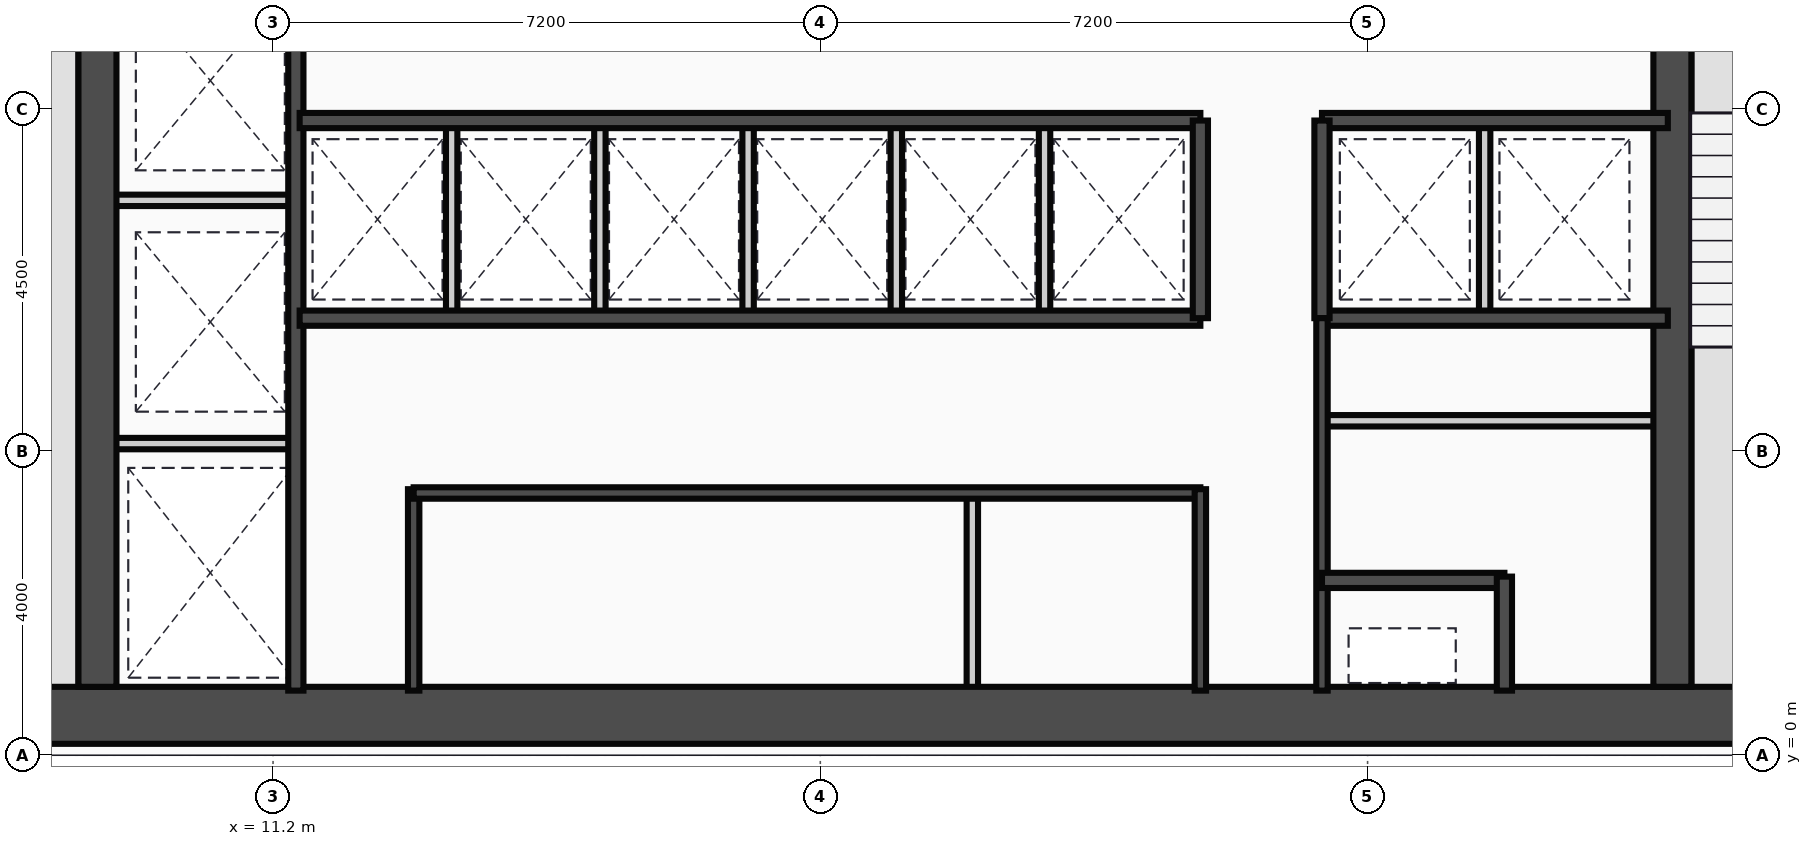
"""IFC4 building model, lengths in metres.
Left out: names, types, materials, properties, quantities, classifications, styles, units other than length and angle.
Written with IfcOpenShell. Run it as: python <this file> out.ifc"""

import sys

from ifc_helpers import new_model, si_unit, direction, frame, frame_2d, origin, place, context, subcontext, project, spatial, rectangle, extrude, source, transform, mapped, element, fill, save


model = new_model("IFC4")
c1 = context("Model", 3, precision=1e-05, world=origin(), true_north=direction((0.0, 1.0)))
c2 = subcontext(c1, "Body", "Model", "MODEL_VIEW")
j1 = project(units=[si_unit("LENGTHUNIT", "METRE"), si_unit("PLANEANGLEUNIT", "RADIAN")], contexts=[c1])
p1 = place(None, origin())
s1 = spatial("IfcSite", under=j1, at=p1, CompositionType="ELEMENT")
p2 = place(p1, origin())
s2 = spatial("IfcBuilding", under=s1, at=p2, CompositionType="ELEMENT")
p3 = place(p2, frame((0.0, 0.0, 184.4)))
s3 = spatial("IfcBuildingStorey", under=s2, at=p3, CompositionType="ELEMENT", Elevation=184.4)
m1 = source(origin(), c2, "Body", "SweptSolid", [
    extrude(rectangle(XDim=29.5, YDim=0.75, at=frame_2d((14.75, 0.0))), origin(), (0.0, 0.0, 1.0), 4.2),
])
p4 = place(p3, frame((4.5, 0.525, 0.0), z_axis=(0.0, 0.0, 1.0), x_axis=(1.0, 0.0, 0.0)))
e1 = element("IfcWall", 1, at=p4, inside=s3, PredefinedType="SHEAR", context=c2, shape_type="MappedRepresentation", body=[
    mapped(m1, transform((0.0, 0.0, 0.0))),
])
m2 = source(origin(), c2, "Body", "SweptSolid", [
    extrude(rectangle(XDim=12.35, YDim=0.5, at=frame_2d((6.175, 0.0))), origin(), (0.0, 0.0, 1.0), 4.2),
])
for number, where, z_axis, x_axis in (
    (2, (8.89, 0.9, 0.0), (0.0, 0.0, 1.0), (0.0, 1.0, 0.0)),
    (3, (29.61, 0.9, 0.0), (0.0, 0.0, 1.0), (0.0, 1.0, 0.0)),
):
    element("IfcWall", number, at=place(p3, frame(where, z_axis=z_axis, x_axis=x_axis)), inside=s3, PredefinedType="SHEAR", context=c2, shape_type="MappedRepresentation", body=[
        mapped(m2, transform((0.0, 0.0, 0.0))),
    ])
m3 = source(origin(), c2, "Body", "SweptSolid", [
    extrude(rectangle(XDim=9.6, YDim=0.2, at=frame_2d((4.8, 0.0))), origin(), (0.0, 0.0, 1.0), 3.95),
])
p5 = place(p3, frame((11.5, 0.85, 0.0), z_axis=(0.0, 0.0, 1.0), x_axis=(0.0, 1.0, 0.0)))
e4 = element("IfcWall", 4, at=p5, inside=s3, PredefinedType="PARTITIONING", context=c2, shape_type="MappedRepresentation", body=[
    mapped(m3, transform((0.0, 0.0, 0.0))),
])
p6 = place(p5, frame((4.2, 0.0, 0.0)))
e5 = element("IfcOpeningElement", 5, at=p6, cuts=e4, PredefinedType="OPENING", context=c2, shape_type="SweptSolid", body=[
    extrude(rectangle(XDim=1.1, YDim=2.15, at=frame_2d((0.55, 1.075))), frame((0.0, 0.11, 0.0), z_axis=(0.0, -1.0, 0.0), x_axis=(1.0, 0.0, 0.0)), (0.0, 0.0, 1.0), 0.22),
])
p7 = place(p5, frame((0.9, 0.0, 0.0)))
e6 = element("IfcOpeningElement", 6, at=p7, cuts=e4, PredefinedType="OPENING", context=c2, shape_type="SweptSolid", body=[
    extrude(rectangle(XDim=1.2, YDim=2.15, at=frame_2d((0.6, 1.075))), frame((0.0, 0.11, 0.0), z_axis=(0.0, -1.0, 0.0), x_axis=(1.0, 0.0, 0.0)), (0.0, 0.0, 1.0), 0.22),
])
m4 = source(origin(), c2, "Body", "SweptSolid", [
    extrude(rectangle(XDim=2.4, YDim=0.15, at=frame_2d((1.2, 0.0))), origin(), (0.0, 0.0, 1.0), 3.95),
])
for number, where, z_axis, x_axis in (
    (7, (9.1, 4.1, 0.0), (0.0, 0.0, 1.0), (1.0, 0.0, 0.0)),
    (8, (9.1, 7.3, 0.0), (0.0, 0.0, 1.0), (1.0, 0.0, 0.0)),
):
    element("IfcWall", number, at=place(p3, frame(where, z_axis=z_axis, x_axis=x_axis)), inside=s3, PredefinedType="PARTITIONING", context=c2, shape_type="MappedRepresentation", body=[
        mapped(m4, transform((0.0, 0.0, 0.0))),
    ])
m5 = source(origin(), c2, "Body", "SweptSolid", [
    extrude(rectangle(XDim=2.65, YDim=0.15, at=frame_2d((1.325, 0.0))), origin(), (0.0, 0.0, 1.0), 3.95),
])
p8 = place(p3, frame((13.05, 0.85, 0.0), z_axis=(0.0, 0.0, 1.0), x_axis=(0.0, 1.0, 0.0)))
e9 = element("IfcWall", 9, at=p8, inside=s3, PredefinedType="PARTITIONING", context=c2, shape_type="MappedRepresentation", body=[
    mapped(m5, transform((0.0, 0.0, 0.0))),
])
m6 = source(origin(), c2, "Body", "SweptSolid", [
    extrude(rectangle(XDim=10.35, YDim=0.15, at=frame_2d((5.175, 0.0))), origin(), (0.0, 0.0, 1.0), 3.95),
])
p9 = place(p3, frame((13.05, 3.45, 0.0), z_axis=(0.0, 0.0, 1.0), x_axis=(1.0, 0.0, 0.0)))
e10 = element("IfcWall", 10, at=p9, inside=s3, PredefinedType="PARTITIONING", context=c2, shape_type="MappedRepresentation", body=[
    mapped(m6, transform((0.0, 0.0, 0.0))),
])
p10 = place(p9, frame((3.8, 0.0, 0.0)))
e11 = element("IfcOpeningElement", 11, at=p10, cuts=e10, PredefinedType="OPENING", context=c2, shape_type="SweptSolid", body=[
    extrude(rectangle(XDim=0.95, YDim=2.15, at=frame_2d((0.475, 1.075))), frame((0.0, 0.085, 0.0), z_axis=(0.0, -1.0, 0.0), x_axis=(1.0, 0.0, 0.0)), (0.0, 0.0, 1.0), 0.17),
])
p11 = place(p9, frame((8.1, 0.0, 0.0)))
e12 = element("IfcOpeningElement", 12, at=p11, cuts=e10, PredefinedType="OPENING", context=c2, shape_type="SweptSolid", body=[
    extrude(rectangle(XDim=0.95, YDim=2.15, at=frame_2d((0.475, 1.075))), frame((0.0, 0.085, 0.0), z_axis=(0.0, -1.0, 0.0), x_axis=(1.0, 0.0, 0.0)), (0.0, 0.0, 1.0), 0.17),
])
p12 = place(p3, frame((23.4, 0.85, 0.0), z_axis=(0.0, 0.0, 1.0), x_axis=(0.0, 1.0, 0.0)))
e13 = element("IfcWall", 13, at=p12, inside=s3, PredefinedType="PARTITIONING", context=c2, shape_type="MappedRepresentation", body=[
    mapped(m5, transform((0.0, 0.0, 0.0))),
])
m7 = source(origin(), c2, "Body", "SweptSolid", [
    extrude(rectangle(XDim=2.6, YDim=0.15, at=frame_2d((1.3, 0.0))), origin(), (0.0, 0.0, 1.0), 3.95),
])
p13 = place(p3, frame((20.4, 0.85, 0.0), z_axis=(0.0, 0.0, 1.0), x_axis=(0.0, 1.0, 0.0)))
e14 = element("IfcWall", 14, at=p13, inside=s3, PredefinedType="PARTITIONING", context=c2, shape_type="MappedRepresentation", body=[
    mapped(m7, transform((0.0, 0.0, 0.0))),
])
m8 = source(origin(), c2, "Body", "SweptSolid", [
    extrude(rectangle(XDim=11.85, YDim=0.2, at=frame_2d((5.925, 0.0))), origin(), (0.0, 0.0, 1.0), 3.95),
])
p14 = place(p3, frame((11.55, 5.75, 0.0), z_axis=(0.0, 0.0, 1.0), x_axis=(1.0, 0.0, 0.0)))
e15 = element("IfcWall", 15, at=p14, inside=s3, PredefinedType="PARTITIONING", context=c2, shape_type="MappedRepresentation", body=[
    mapped(m8, transform((0.0, 0.0, 0.0))),
])
p15 = place(p14, frame((0.45, 0.0, 0.0)))
e16 = element("IfcOpeningElement", 16, at=p15, cuts=e15, PredefinedType="OPENING", context=c2, shape_type="SweptSolid", body=[
    extrude(rectangle(XDim=1.05, YDim=2.15, at=frame_2d((0.525, 1.075))), frame((0.0, 0.11, 0.0), z_axis=(0.0, -1.0, 0.0), x_axis=(1.0, 0.0, 0.0)), (0.0, 0.0, 1.0), 0.22),
])
p16 = place(p14, frame((2.4, 0.0, 0.0)))
e17 = element("IfcOpeningElement", 17, at=p16, cuts=e15, PredefinedType="OPENING", context=c2, shape_type="SweptSolid", body=[
    extrude(rectangle(XDim=1.05, YDim=2.15, at=frame_2d((0.525, 1.075))), frame((0.0, 0.11, 0.0), z_axis=(0.0, -1.0, 0.0), x_axis=(1.0, 0.0, 0.0)), (0.0, 0.0, 1.0), 0.22),
])
p17 = place(p14, frame((4.35, 0.0, 0.0)))
e18 = element("IfcOpeningElement", 18, at=p17, cuts=e15, PredefinedType="OPENING", context=c2, shape_type="SweptSolid", body=[
    extrude(rectangle(XDim=1.05, YDim=2.15, at=frame_2d((0.525, 1.075))), frame((0.0, 0.11, 0.0), z_axis=(0.0, -1.0, 0.0), x_axis=(1.0, 0.0, 0.0)), (0.0, 0.0, 1.0), 0.22),
])
p18 = place(p14, frame((6.3, 0.0, 0.0)))
e19 = element("IfcOpeningElement", 19, at=p18, cuts=e15, PredefinedType="OPENING", context=c2, shape_type="SweptSolid", body=[
    extrude(rectangle(XDim=1.05, YDim=2.15, at=frame_2d((0.525, 1.075))), frame((0.0, 0.11, 0.0), z_axis=(0.0, -1.0, 0.0), x_axis=(1.0, 0.0, 0.0)), (0.0, 0.0, 1.0), 0.22),
])
p19 = place(p14, frame((8.25, 0.0, 0.0)))
e20 = element("IfcOpeningElement", 20, at=p19, cuts=e15, PredefinedType="OPENING", context=c2, shape_type="SweptSolid", body=[
    extrude(rectangle(XDim=1.05, YDim=2.15, at=frame_2d((0.525, 1.075))), frame((0.0, 0.11, 0.0), z_axis=(0.0, -1.0, 0.0), x_axis=(1.0, 0.0, 0.0)), (0.0, 0.0, 1.0), 0.22),
])
p20 = place(p14, frame((10.2, 0.0, 0.0)))
e21 = element("IfcOpeningElement", 21, at=p20, cuts=e15, PredefinedType="OPENING", context=c2, shape_type="SweptSolid", body=[
    extrude(rectangle(XDim=1.05, YDim=2.15, at=frame_2d((0.525, 1.075))), frame((0.0, 0.11, 0.0), z_axis=(0.0, -1.0, 0.0), x_axis=(1.0, 0.0, 0.0)), (0.0, 0.0, 1.0), 0.22),
])
p21 = place(p3, frame((11.55, 8.35, 0.0), z_axis=(0.0, 0.0, 1.0), x_axis=(1.0, 0.0, 0.0)))
e22 = element("IfcWall", 22, at=p21, inside=s3, PredefinedType="PARTITIONING", context=c2, shape_type="MappedRepresentation", body=[
    mapped(m8, transform((0.0, 0.0, 0.0))),
])
m9 = source(origin(), c2, "Body", "SweptSolid", [
    extrude(rectangle(XDim=2.6, YDim=0.2, at=frame_2d((1.3, 0.0))), origin(), (0.0, 0.0, 1.0), 3.95),
])
p22 = place(p3, frame((23.4, 5.75, 0.0), z_axis=(0.0, 0.0, 1.0), x_axis=(0.0, 1.0, 0.0)))
e23 = element("IfcWall", 23, at=p22, inside=s3, PredefinedType="PARTITIONING", context=c2, shape_type="MappedRepresentation", body=[
    mapped(m9, transform((0.0, 0.0, 0.0))),
])
m10 = source(origin(), c2, "Body", "SweptSolid", [
    extrude(rectangle(XDim=2.5, YDim=0.15, at=frame_2d((1.25, 0.0))), origin(), (0.0, 0.0, 1.0), 3.95),
])
for number, where, z_axis, x_axis in (
    (24, (13.55, 5.8, 0.0), (0.0, 0.0, 1.0), (0.0, 1.0, 0.0)),
    (25, (15.5, 5.8, 0.0), (0.0, 0.0, 1.0), (0.0, 1.0, 0.0)),
    (26, (17.45, 5.8, 0.0), (0.0, 0.0, 1.0), (0.0, 1.0, 0.0)),
    (27, (19.4, 5.8, 0.0), (0.0, 0.0, 1.0), (0.0, 1.0, 0.0)),
    (28, (21.35, 5.8, 0.0), (0.0, 0.0, 1.0), (0.0, 1.0, 0.0)),
):
    element("IfcWall", number, at=place(p3, frame(where, z_axis=z_axis, x_axis=x_axis)), inside=s3, PredefinedType="PARTITIONING", context=c2, shape_type="MappedRepresentation", body=[
        mapped(m10, transform((0.0, 0.0, 0.0))),
    ])
m11 = source(origin(), c2, "Body", "SweptSolid", [
    extrude(rectangle(XDim=4.55, YDim=0.2, at=frame_2d((2.275, 0.0))), origin(), (0.0, 0.0, 1.0), 3.95),
])
p23 = place(p3, frame((25.0, 8.35, 0.0), z_axis=(0.0, 0.0, 1.0), x_axis=(1.0, 0.0, 0.0)))
e29 = element("IfcWall", 29, at=p23, inside=s3, PredefinedType="PARTITIONING", context=c2, shape_type="MappedRepresentation", body=[
    mapped(m11, transform((0.0, 0.0, 0.0))),
])
p24 = place(p23, frame((0.5, 0.0, 0.0)))
e30 = element("IfcOpeningElement", 30, at=p24, cuts=e29, PredefinedType="OPENING", context=c2, shape_type="SweptSolid", body=[
    extrude(rectangle(XDim=1.05, YDim=2.15, at=frame_2d((0.525, 1.075))), frame((0.0, 0.11, 0.0), z_axis=(0.0, -1.0, 0.0), x_axis=(1.0, 0.0, 0.0)), (0.0, 0.0, 1.0), 0.22),
])
p25 = place(p23, frame((2.6, 0.0, 0.0)))
e31 = element("IfcOpeningElement", 31, at=p25, cuts=e29, PredefinedType="OPENING", context=c2, shape_type="SweptSolid", body=[
    extrude(rectangle(XDim=1.05, YDim=2.15, at=frame_2d((0.525, 1.075))), frame((0.0, 0.11, 0.0), z_axis=(0.0, -1.0, 0.0), x_axis=(1.0, 0.0, 0.0)), (0.0, 0.0, 1.0), 0.22),
])
p26 = place(p3, frame((25.0, 5.75, 0.0), z_axis=(0.0, 0.0, 1.0), x_axis=(1.0, 0.0, 0.0)))
e32 = element("IfcWall", 32, at=p26, inside=s3, PredefinedType="PARTITIONING", context=c2, shape_type="MappedRepresentation", body=[
    mapped(m11, transform((0.0, 0.0, 0.0))),
])
p27 = place(p3, frame((25.0, 5.75, 0.0), z_axis=(0.0, 0.0, 1.0), x_axis=(0.0, 1.0, 0.0)))
e33 = element("IfcWall", 33, at=p27, inside=s3, PredefinedType="PARTITIONING", context=c2, shape_type="MappedRepresentation", body=[
    mapped(m9, transform((0.0, 0.0, 0.0))),
])
p28 = place(p3, frame((27.14, 5.8, 0.0), z_axis=(0.0, 0.0, 1.0), x_axis=(0.0, 1.0, 0.0)))
e34 = element("IfcWall", 34, at=p28, inside=s3, PredefinedType="PARTITIONING", context=c2, shape_type="MappedRepresentation", body=[
    mapped(m10, transform((0.0, 0.0, 0.0))),
])
m12 = source(origin(), c2, "Body", "SweptSolid", [
    extrude(rectangle(XDim=4.9, YDim=0.15, at=frame_2d((2.45, 0.0))), origin(), (0.0, 0.0, 1.0), 3.95),
])
p29 = place(p3, frame((25.0, 0.85, 0.0), z_axis=(0.0, 0.0, 1.0), x_axis=(0.0, 1.0, 0.0)))
e35 = element("IfcWall", 35, at=p29, inside=s3, PredefinedType="PARTITIONING", context=c2, shape_type="MappedRepresentation", body=[
    mapped(m12, transform((0.0, 0.0, 0.0))),
])
p30 = place(p29, frame((2.0, 0.0, 0.0)))
e36 = element("IfcOpeningElement", 36, at=p30, cuts=e35, PredefinedType="OPENING", context=c2, shape_type="SweptSolid", body=[
    extrude(rectangle(XDim=0.95, YDim=2.15, at=frame_2d((0.475, 1.075))), frame((0.0, 0.085, 0.0), z_axis=(0.0, -1.0, 0.0), x_axis=(1.0, 0.0, 0.0)), (0.0, 0.0, 1.0), 0.17),
])
p31 = place(p29, frame((3.75, 0.0, 0.0)))
e37 = element("IfcOpeningElement", 37, at=p31, cuts=e35, PredefinedType="OPENING", context=c2, shape_type="SweptSolid", body=[
    extrude(rectangle(XDim=0.85, YDim=2.15, at=frame_2d((0.425, 1.075))), frame((0.0, 0.085, 0.0), z_axis=(0.0, -1.0, 0.0), x_axis=(1.0, 0.0, 0.0)), (0.0, 0.0, 1.0), 0.17),
])
m13 = source(origin(), c2, "Body", "SweptSolid", [
    extrude(rectangle(XDim=2.4, YDim=0.2, at=frame_2d((1.2, 0.0))), origin(), (0.0, 0.0, 1.0), 3.95),
])
p32 = place(p3, frame((25.0, 2.3, 0.0), z_axis=(0.0, 0.0, 1.0), x_axis=(1.0, 0.0, 0.0)))
e38 = element("IfcWall", 38, at=p32, inside=s3, PredefinedType="PARTITIONING", context=c2, shape_type="MappedRepresentation", body=[
    mapped(m13, transform((0.0, 0.0, 0.0))),
])
m14 = source(origin(), c2, "Body", "SweptSolid", [
    extrude(rectangle(XDim=1.5, YDim=0.2, at=frame_2d((0.75, 0.0))), origin(), (0.0, 0.0, 1.0), 3.95),
])
p33 = place(p3, frame((27.4, 0.85, 0.0), z_axis=(0.0, 0.0, 1.0), x_axis=(0.0, 1.0, 0.0)))
e39 = element("IfcWall", 39, at=p33, inside=s3, PredefinedType="PARTITIONING", context=c2, shape_type="MappedRepresentation", body=[
    mapped(m14, transform((0.0, 0.0, 0.0))),
])
m15 = source(origin(), c2, "Body", "SweptSolid", [
    extrude(rectangle(XDim=4.55, YDim=0.15, at=frame_2d((2.275, 0.0))), origin(), (0.0, 0.0, 1.0), 3.95),
])
p34 = place(p3, frame((25.0, 4.4, 0.0), z_axis=(0.0, 0.0, 1.0), x_axis=(1.0, 0.0, 0.0)))
e40 = element("IfcWall", 40, at=p34, inside=s3, PredefinedType="PARTITIONING", context=c2, shape_type="MappedRepresentation", body=[
    mapped(m15, transform((0.0, 0.0, 0.0))),
])
m16 = source(origin(), c2, "Body", "SweptSolid", [
    extrude(rectangle(XDim=1.1, YDim=2.15, at=frame_2d((0.55, 1.075))), frame((0.0, 0.025, 0.0), z_axis=(0.0, -1.0, 0.0), x_axis=(1.0, 0.0, 0.0)), (0.0, 0.0, 1.0), 0.05),
])
p35 = place(p6, frame((1.1, 0.0, 0.0), z_axis=(0.0, 0.0, 1.0), x_axis=(-1.0, 0.0, 0.0)))
e41 = element("IfcDoor", 41, at=p35, inside=s3, OperationType="SLIDING_TO_LEFT", PredefinedType="DOOR", context=c2, shape_type="MappedRepresentation", body=[
    mapped(m16, transform((0.0, 0.0, 0.0))),
])
fill(e5, e41)
m17 = source(origin(), c2, "Body", "SweptSolid", [
    extrude(rectangle(XDim=1.2, YDim=2.15, at=frame_2d((0.6, 1.075))), frame((0.0, 0.025, 0.0), z_axis=(0.0, -1.0, 0.0), x_axis=(1.0, 0.0, 0.0)), (0.0, 0.0, 1.0), 0.05),
])
p36 = place(p7, frame((1.2, 0.0, 0.0), z_axis=(0.0, 0.0, 1.0), x_axis=(-1.0, 0.0, 0.0)))
e42 = element("IfcDoor", 42, at=p36, inside=s3, OperationType="SLIDING_TO_LEFT", PredefinedType="DOOR", context=c2, shape_type="MappedRepresentation", body=[
    mapped(m17, transform((0.0, 0.0, 0.0))),
])
fill(e6, e42)
m18 = source(origin(), c2, "Body", "SweptSolid", [
    extrude(rectangle(XDim=0.95, YDim=2.15, at=frame_2d((0.475, 1.075))), frame((0.0, 0.025, 0.0), z_axis=(0.0, -1.0, 0.0), x_axis=(1.0, 0.0, 0.0)), (0.0, 0.0, 1.0), 0.05),
])
p37 = place(p10, origin())
e43 = element("IfcDoor", 43, at=p37, inside=s3, OperationType="SINGLE_SWING_LEFT", PredefinedType="DOOR", context=c2, shape_type="MappedRepresentation", body=[
    mapped(m18, transform((0.0, 0.0, 0.0))),
])
fill(e11, e43)
p38 = place(p11, origin())
e44 = element("IfcDoor", 44, at=p38, inside=s3, OperationType="SINGLE_SWING_RIGHT", PredefinedType="DOOR", context=c2, shape_type="MappedRepresentation", body=[
    mapped(m18, transform((0.0, 0.0, 0.0))),
])
fill(e12, e44)
m19 = source(origin(), c2, "Body", "SweptSolid", [
    extrude(rectangle(XDim=1.05, YDim=2.15, at=frame_2d((0.525, 1.075))), frame((0.0, 0.025, 0.0), z_axis=(0.0, -1.0, 0.0), x_axis=(1.0, 0.0, 0.0)), (0.0, 0.0, 1.0), 0.05),
])
p39 = place(p15, frame((1.05, 0.0, 0.0), z_axis=(0.0, 0.0, 1.0), x_axis=(-1.0, 0.0, 0.0)))
e45 = element("IfcDoor", 45, at=p39, inside=s3, OperationType="SLIDING_TO_LEFT", PredefinedType="DOOR", context=c2, shape_type="MappedRepresentation", body=[
    mapped(m19, transform((0.0, 0.0, 0.0))),
])
fill(e16, e45)
p40 = place(p16, frame((1.05, 0.0, 0.0), z_axis=(0.0, 0.0, 1.0), x_axis=(-1.0, 0.0, 0.0)))
e46 = element("IfcDoor", 46, at=p40, inside=s3, OperationType="SLIDING_TO_LEFT", PredefinedType="DOOR", context=c2, shape_type="MappedRepresentation", body=[
    mapped(m19, transform((0.0, 0.0, 0.0))),
])
fill(e17, e46)
p41 = place(p17, frame((1.05, 0.0, 0.0), z_axis=(0.0, 0.0, 1.0), x_axis=(-1.0, 0.0, 0.0)))
e47 = element("IfcDoor", 47, at=p41, inside=s3, OperationType="SLIDING_TO_LEFT", PredefinedType="DOOR", context=c2, shape_type="MappedRepresentation", body=[
    mapped(m19, transform((0.0, 0.0, 0.0))),
])
fill(e18, e47)
p42 = place(p18, frame((1.05, 0.0, 0.0), z_axis=(0.0, 0.0, 1.0), x_axis=(-1.0, 0.0, 0.0)))
e48 = element("IfcDoor", 48, at=p42, inside=s3, OperationType="SLIDING_TO_LEFT", PredefinedType="DOOR", context=c2, shape_type="MappedRepresentation", body=[
    mapped(m19, transform((0.0, 0.0, 0.0))),
])
fill(e19, e48)
p43 = place(p19, frame((1.05, 0.0, 0.0), z_axis=(0.0, 0.0, 1.0), x_axis=(-1.0, 0.0, 0.0)))
e49 = element("IfcDoor", 49, at=p43, inside=s3, OperationType="SLIDING_TO_LEFT", PredefinedType="DOOR", context=c2, shape_type="MappedRepresentation", body=[
    mapped(m19, transform((0.0, 0.0, 0.0))),
])
fill(e20, e49)
p44 = place(p20, frame((1.05, 0.0, 0.0), z_axis=(0.0, 0.0, 1.0), x_axis=(-1.0, 0.0, 0.0)))
e50 = element("IfcDoor", 50, at=p44, inside=s3, OperationType="SLIDING_TO_LEFT", PredefinedType="DOOR", context=c2, shape_type="MappedRepresentation", body=[
    mapped(m19, transform((0.0, 0.0, 0.0))),
])
fill(e21, e50)
p45 = place(p24, origin())
e51 = element("IfcDoor", 51, at=p45, inside=s3, OperationType="SLIDING_TO_LEFT", PredefinedType="DOOR", context=c2, shape_type="MappedRepresentation", body=[
    mapped(m19, transform((0.0, 0.0, 0.0))),
])
fill(e30, e51)
p46 = place(p25, origin())
e52 = element("IfcDoor", 52, at=p46, inside=s3, OperationType="SLIDING_TO_LEFT", PredefinedType="DOOR", context=c2, shape_type="MappedRepresentation", body=[
    mapped(m19, transform((0.0, 0.0, 0.0))),
])
fill(e31, e52)
p47 = place(p30, origin())
e53 = element("IfcDoor", 53, at=p47, inside=s3, OperationType="SINGLE_SWING_LEFT", PredefinedType="DOOR", context=c2, shape_type="MappedRepresentation", body=[
    mapped(m18, transform((0.0, 0.0, 0.0))),
])
fill(e36, e53)
m20 = source(origin(), c2, "Body", "SweptSolid", [
    extrude(rectangle(XDim=0.85, YDim=2.15, at=frame_2d((0.425, 1.075))), frame((0.0, 0.025, 0.0), z_axis=(0.0, -1.0, 0.0), x_axis=(1.0, 0.0, 0.0)), (0.0, 0.0, 1.0), 0.05),
])
p48 = place(p31, origin())
e54 = element("IfcDoor", 54, at=p48, inside=s3, OperationType="SINGLE_SWING_RIGHT", PredefinedType="DOOR", context=c2, shape_type="MappedRepresentation", body=[
    mapped(m20, transform((0.0, 0.0, 0.0))),
])
fill(e37, e54)
save(model, sys.argv[1])
